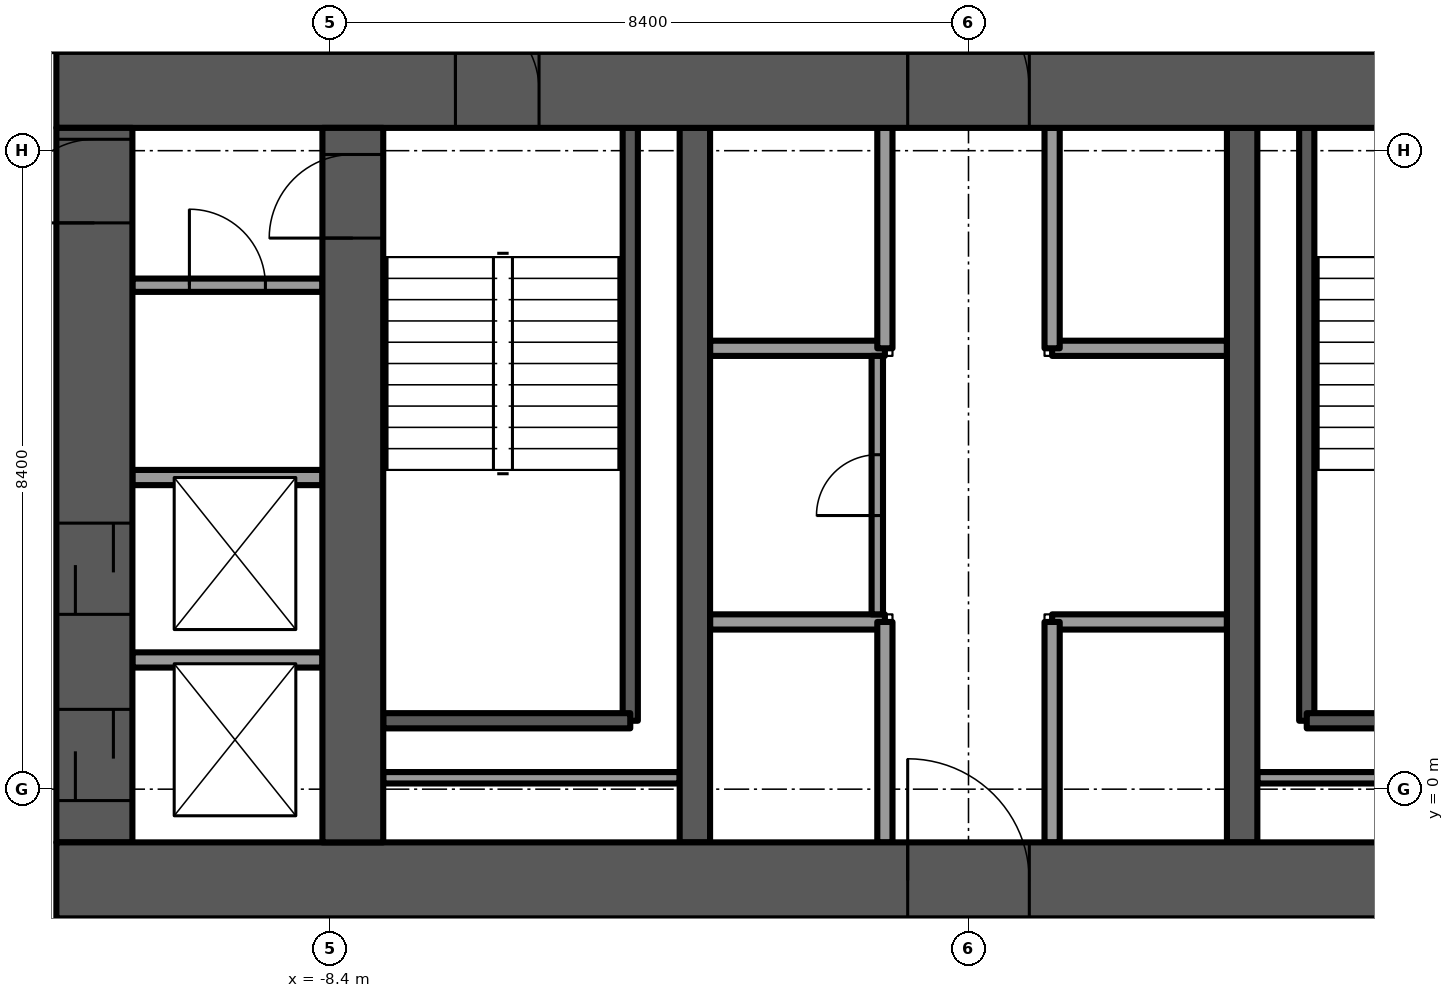
"""IFC4 building model, lengths in metres.
Left out: names, types, materials, properties, quantities, classifications, styles, units other than length and angle.
Written with IfcOpenShell. Run it as: python <this file> out.ifc"""

import sys

from ifc_helpers import new_model, si_unit, direction, frame, frame_2d, origin, place, context, subcontext, project, spatial, rectangle, extrude, element, fill, save


model = new_model("IFC4")
c1 = context("Model", 3, precision=1e-05, world=origin(), true_north=direction((0.0, 1.0)))
c2 = subcontext(c1, "Body", "Model", "MODEL_VIEW")
j1 = project(units=[si_unit("LENGTHUNIT", "METRE"), si_unit("PLANEANGLEUNIT", "RADIAN")], contexts=[c1])
p1 = place(None, origin())
s1 = spatial("IfcSite", under=j1, at=p1, CompositionType="ELEMENT")
p2 = place(p1, origin())
s2 = spatial("IfcBuilding", under=s1, at=p2, CompositionType="ELEMENT")
p3 = place(p2, frame((0.0, 0.0, 85.5)))
s3 = spatial("IfcBuildingStorey", under=s2, at=p3, CompositionType="ELEMENT", Elevation=85.5)
p4 = place(p3, frame((-12.0, -1.2, -0.3), z_axis=(0.0, 0.0, 1.0), x_axis=(1.0, 0.0, 0.0)))
e1 = element("IfcWall", 1, at=p4, inside=s3, PredefinedType="SHEAR", context=c2, shape_type="SweptSolid", body=[
    extrude(rectangle(XDim=24.0, YDim=1.0, at=frame_2d((12.0, 0.0))), origin(), (0.0, 0.0, 1.0), 3.75),
])
p5 = place(p4, frame((11.2, 0.0, 0.0)))
e2 = element("IfcOpeningElement", 2, at=p5, cuts=e1, PredefinedType="OPENING", context=c2, shape_type="SweptSolid", body=[
    extrude(rectangle(XDim=1.6, YDim=2.1, at=frame_2d((0.8, 1.05))), frame((0.0, 0.5, 0.0), z_axis=(0.0, -1.0, 0.0), x_axis=(1.0, 0.0, 0.0)), (0.0, 0.0, 1.0), 1.0),
])
p6 = place(p3, frame((-12.0, 9.2, -0.3), z_axis=(0.0, 0.0, 1.0), x_axis=(1.0, 0.0, 0.0)))
e3 = element("IfcWall", 3, at=p6, inside=s3, PredefinedType="SHEAR", context=c2, shape_type="SweptSolid", body=[
    extrude(rectangle(XDim=24.0, YDim=1.0, at=frame_2d((12.0, 0.0))), origin(), (0.0, 0.0, 1.0), 3.75),
])
p7 = place(p6, frame((11.2, 0.0, 0.0)))
e4 = element("IfcOpeningElement", 4, at=p7, cuts=e3, PredefinedType="OPENING", context=c2, shape_type="SweptSolid", body=[
    extrude(rectangle(XDim=1.6, YDim=2.1, at=frame_2d((0.8, 1.05))), frame((0.0, 0.5, 0.0), z_axis=(0.0, -1.0, 0.0), x_axis=(1.0, 0.0, 0.0)), (0.0, 0.0, 1.0), 1.0),
])
p8 = place(p6, frame((5.25, 0.0, 0.0)))
e5 = element("IfcOpeningElement", 5, at=p8, cuts=e3, PredefinedType="OPENING", context=c2, shape_type="SweptSolid", body=[
    extrude(rectangle(XDim=1.1, YDim=2.1, at=frame_2d((0.55, 1.05))), frame((0.0, 0.5, 0.0), z_axis=(0.0, -1.0, 0.0), x_axis=(1.0, 0.0, 0.0)), (0.0, 0.0, 1.0), 1.0),
])
p9 = place(p6, frame((17.65, 0.0, 0.0)))
e6 = element("IfcOpeningElement", 6, at=p9, cuts=e3, PredefinedType="OPENING", context=c2, shape_type="SweptSolid", body=[
    extrude(rectangle(XDim=1.1, YDim=2.1, at=frame_2d((0.55, 1.05))), frame((0.0, 0.5, 0.0), z_axis=(0.0, -1.0, 0.0), x_axis=(1.0, 0.0, 0.0)), (0.0, 0.0, 1.0), 1.0),
])
p10 = place(p3, frame((-8.1, -0.7, -0.3), z_axis=(0.0, 0.0, 1.0), x_axis=(0.0, 1.0, 0.0)))
e7 = element("IfcWall", 7, at=p10, inside=s3, PredefinedType="SHEAR", context=c2, shape_type="SweptSolid", body=[
    extrude(rectangle(XDim=9.4, YDim=0.8, at=frame_2d((4.7, 0.0))), origin(), (0.0, 0.0, 1.0), 3.75),
])
p11 = place(p10, frame((7.95, 0.0, 0.0)))
e8 = element("IfcOpeningElement", 8, at=p11, cuts=e7, PredefinedType="OPENING", context=c2, shape_type="SweptSolid", body=[
    extrude(rectangle(XDim=1.1, YDim=2.1, at=frame_2d((0.55, 1.05))), frame((0.0, 0.4, 0.0), z_axis=(0.0, -1.0, 0.0), x_axis=(1.0, 0.0, 0.0)), (0.0, 0.0, 1.0), 0.8),
])
for number, where, z_axis, x_axis in (
    (9, (-3.6, -0.7, -0.3), (0.0, 0.0, 1.0), (0.0, 1.0, 0.0)),
    (10, (3.6, -0.7, -0.3), (0.0, 0.0, 1.0), (0.0, 1.0, 0.0)),
):
    element("IfcWall", number, at=place(p3, frame(where, z_axis=z_axis, x_axis=x_axis)), inside=s3, PredefinedType="SHEAR", context=c2, shape_type="SweptSolid", body=[
        extrude(rectangle(XDim=9.4, YDim=0.4, at=frame_2d((4.7, 0.0))), origin(), (0.0, 0.0, 1.0), 3.75),
    ])
p12 = place(p3, frame((-11.5, -0.7, -0.3), z_axis=(0.0, 0.0, 1.0), x_axis=(0.0, 1.0, 0.0)))
e11 = element("IfcWall", 11, at=p12, inside=s3, PredefinedType="SHEAR", context=c2, shape_type="SweptSolid", body=[
    extrude(rectangle(XDim=9.4, YDim=1.0, at=frame_2d((4.7, 0.0))), origin(), (0.0, 0.0, 1.0), 3.75),
])
p13 = place(p12, frame((8.15, 0.0, 0.0)))
e12 = element("IfcOpeningElement", 12, at=p13, cuts=e11, PredefinedType="OPENING", context=c2, shape_type="SweptSolid", body=[
    extrude(rectangle(XDim=1.1, YDim=2.1, at=frame_2d((0.55, 1.05))), frame((0.0, 0.5, 0.0), z_axis=(0.0, -1.0, 0.0), x_axis=(1.0, 0.0, 0.0)), (0.0, 0.0, 1.0), 1.0),
])
p14 = place(p12, frame((0.55, 0.0, 0.0)))
e13 = element("IfcOpeningElement", 13, at=p14, cuts=e11, PredefinedType="OPENING", context=c2, shape_type="SweptSolid", body=[
    extrude(rectangle(XDim=1.2, YDim=2.1, at=frame_2d((0.6, 1.05))), frame((0.0, 0.5, 0.0), z_axis=(0.0, -1.0, 0.0), x_axis=(1.0, 0.0, 0.0)), (0.0, 0.0, 1.0), 1.0),
])
p15 = place(p12, frame((3.0, 0.0, 0.0)))
e14 = element("IfcOpeningElement", 14, at=p15, cuts=e11, PredefinedType="OPENING", context=c2, shape_type="SweptSolid", body=[
    extrude(rectangle(XDim=1.2, YDim=2.1, at=frame_2d((0.6, 1.05))), frame((0.0, 0.5, 0.0), z_axis=(0.0, -1.0, 0.0), x_axis=(1.0, 0.0, 0.0)), (0.0, 0.0, 1.0), 1.0),
])
p16 = place(p3, frame((-8.694, 18.792, 0.0), z_axis=(0.0, 0.0, 1.0), x_axis=(-0.49999341138, -0.866029207692, 0.0)))
e15 = element("IfcWall", 15, at=p16, inside=s3, PredefinedType="SOLIDWALL", context=c2, shape_type="SweptSolid", body=[
    extrude(rectangle(XDim=21.085, YDim=0.15, at=frame_2d((10.542, 0.0))), origin(), (0.0, 0.0, 1.0), 3.45),
])
p17 = place(p16, frame((4.293, 0.0, 0.15)))
e16 = element("IfcOpeningElement", 16, at=p17, cuts=e15, PredefinedType="OPENING", context=c2, shape_type="SweptSolid", body=[
    extrude(rectangle(XDim=0.9, YDim=2.85, at=frame_2d((0.45, 1.425))), frame((0.0, 0.075, 0.0), z_axis=(0.0, -1.0, 0.0), x_axis=(1.0, 0.0, 0.0)), (0.0, 0.0, 1.0), 0.15),
])
p18 = place(p16, frame((10.485, 0.0, 0.15)))
e17 = element("IfcOpeningElement", 17, at=p18, cuts=e15, PredefinedType="OPENING", context=c2, shape_type="SweptSolid", body=[
    extrude(rectangle(XDim=0.9, YDim=2.85, at=frame_2d((0.45, 1.425))), frame((0.0, 0.075, 0.0), z_axis=(0.0, -1.0, 0.0), x_axis=(1.0, 0.0, 0.0)), (0.0, 0.0, 1.0), 0.15),
])
p19 = place(p16, frame((8.156, 0.0, 0.15)))
e18 = element("IfcOpeningElement", 18, at=p19, cuts=e15, PredefinedType="OPENING", context=c2, shape_type="SweptSolid", body=[
    extrude(rectangle(XDim=1.5, YDim=2.85, at=frame_2d((0.75, 1.425))), frame((0.0, 0.075, 0.0), z_axis=(0.0, -1.0, 0.0), x_axis=(1.0, 0.0, 0.0)), (0.0, 0.0, 1.0), 0.15),
])
p20 = place(p16, frame((12.228, 0.0, 0.15)))
e19 = element("IfcOpeningElement", 19, at=p20, cuts=e15, PredefinedType="OPENING", context=c2, shape_type="SweptSolid", body=[
    extrude(rectangle(XDim=1.7, YDim=2.85, at=frame_2d((0.85, 1.425))), frame((0.0, 0.075, 0.0), z_axis=(0.0, -1.0, 0.0), x_axis=(1.0, 0.0, 0.0)), (0.0, 0.0, 1.0), 0.15),
])
p21 = place(p16, frame((14.328, 0.0, 0.15)))
e20 = element("IfcOpeningElement", 20, at=p21, cuts=e15, PredefinedType="OPENING", context=c2, shape_type="SweptSolid", body=[
    extrude(rectangle(XDim=1.5, YDim=2.85, at=frame_2d((0.75, 1.425))), frame((0.0, 0.075, 0.0), z_axis=(0.0, -1.0, 0.0), x_axis=(1.0, 0.0, 0.0)), (0.0, 0.0, 1.0), 0.15),
])
p22 = place(p16, frame((16.649, 0.0, 0.15)))
e21 = element("IfcOpeningElement", 21, at=p22, cuts=e15, PredefinedType="OPENING", context=c2, shape_type="SweptSolid", body=[
    extrude(rectangle(XDim=1.7, YDim=2.85, at=frame_2d((0.85, 1.425))), frame((0.0, 0.075, 0.0), z_axis=(0.0, -1.0, 0.0), x_axis=(1.0, 0.0, 0.0)), (0.0, 0.0, 1.0), 0.15),
])
p23 = place(p16, frame((18.528, 0.0, 0.0)))
e22 = element("IfcOpeningElement", 22, at=p23, cuts=e15, PredefinedType="OPENING", context=c2, shape_type="SweptSolid", body=[
    extrude(rectangle(XDim=1.5, YDim=2.4, at=frame_2d((0.75, 1.2))), frame((0.0, 0.075, 0.0), z_axis=(0.0, -1.0, 0.0), x_axis=(1.0, 0.0, 0.0)), (0.0, 0.0, 1.0), 0.15),
])
p24 = place(p16, frame((0.864, 0.0, 0.15)))
e23 = element("IfcOpeningElement", 23, at=p24, cuts=e15, PredefinedType="OPENING", context=c2, shape_type="SweptSolid", body=[
    extrude(rectangle(XDim=1.7, YDim=2.73, at=frame_2d((0.85, 1.365))), frame((0.0, 0.075, 0.0), z_axis=(0.0, -1.0, 0.0), x_axis=(1.0, 0.0, 0.0)), (0.0, 0.0, 1.0), 0.15),
])
p25 = place(p3, frame((-19.236, -0.532, 0.0), z_axis=(0.0, 0.0, 1.0), x_axis=(0.499995945303, -0.866027744752, 0.0)))
e24 = element("IfcWall", 24, at=p25, inside=s3, PredefinedType="SOLIDWALL", context=c2, shape_type="SweptSolid", body=[
    extrude(rectangle(XDim=18.314, YDim=0.15, at=frame_2d((9.157, 0.0))), origin(), (0.0, 0.0, 1.0), 3.45),
])
p26 = place(p25, frame((4.784, 0.0, 0.15)))
e25 = element("IfcOpeningElement", 25, at=p26, cuts=e24, PredefinedType="OPENING", context=c2, shape_type="SweptSolid", body=[
    extrude(rectangle(XDim=1.5, YDim=2.85, at=frame_2d((0.75, 1.425))), frame((0.0, 0.075, 0.0), z_axis=(0.0, -1.0, 0.0), x_axis=(1.0, 0.0, 0.0)), (0.0, 0.0, 1.0), 0.15),
])
p27 = place(p25, frame((7.357, 0.0, 0.15)))
e26 = element("IfcOpeningElement", 26, at=p27, cuts=e24, PredefinedType="OPENING", context=c2, shape_type="SweptSolid", body=[
    extrude(rectangle(XDim=1.7, YDim=2.85, at=frame_2d((0.85, 1.425))), frame((0.0, 0.075, 0.0), z_axis=(0.0, -1.0, 0.0), x_axis=(1.0, 0.0, 0.0)), (0.0, 0.0, 1.0), 0.15),
])
p28 = place(p25, frame((9.457, 0.0, 0.0)))
e27 = element("IfcOpeningElement", 27, at=p28, cuts=e24, PredefinedType="OPENING", context=c2, shape_type="SweptSolid", body=[
    extrude(rectangle(XDim=1.5, YDim=2.4, at=frame_2d((0.75, 1.2))), frame((0.0, 0.075, 0.0), z_axis=(0.0, -1.0, 0.0), x_axis=(1.0, 0.0, 0.0)), (0.0, 0.0, 1.0), 0.15),
])
p29 = place(p25, frame((11.557, 0.0, 0.15)))
e28 = element("IfcOpeningElement", 28, at=p29, cuts=e24, PredefinedType="OPENING", context=c2, shape_type="SweptSolid", body=[
    extrude(rectangle(XDim=1.7, YDim=2.85, at=frame_2d((0.85, 1.425))), frame((0.0, 0.075, 0.0), z_axis=(0.0, -1.0, 0.0), x_axis=(1.0, 0.0, 0.0)), (0.0, 0.0, 1.0), 0.15),
])
p30 = place(p25, frame((13.657, 0.0, 0.0)))
e29 = element("IfcOpeningElement", 29, at=p30, cuts=e24, PredefinedType="OPENING", context=c2, shape_type="SweptSolid", body=[
    extrude(rectangle(XDim=1.5, YDim=2.4, at=frame_2d((0.75, 1.2))), frame((0.0, 0.075, 0.0), z_axis=(0.0, -1.0, 0.0), x_axis=(1.0, 0.0, 0.0)), (0.0, 0.0, 1.0), 0.15),
])
p31 = place(p25, frame((0.528, 0.0, 0.15)))
e30 = element("IfcOpeningElement", 30, at=p31, cuts=e24, PredefinedType="OPENING", context=c2, shape_type="SweptSolid", body=[
    extrude(rectangle(XDim=1.7, YDim=2.73, at=frame_2d((0.85, 1.365))), frame((0.0, 0.075, 0.0), z_axis=(0.0, -1.0, 0.0), x_axis=(1.0, 0.0, 0.0)), (0.0, 0.0, 1.0), 0.15),
])
p32 = place(p25, frame((16.085, 0.0, 0.15)))
e31 = element("IfcOpeningElement", 31, at=p32, cuts=e24, PredefinedType="OPENING", context=c2, shape_type="SweptSolid", body=[
    extrude(rectangle(XDim=1.7, YDim=2.73, at=frame_2d((0.85, 1.365))), frame((0.0, 0.075, 0.0), z_axis=(0.0, -1.0, 0.0), x_axis=(1.0, 0.0, 0.0)), (0.0, 0.0, 1.0), 0.15),
])
for number, where, z_axis, x_axis in (
    (32, (-3.4, 2.2, 0.0), (0.0, 0.0, 1.0), (1.0, 0.0, 0.0)),
    (33, (-3.4, 5.8, 0.0), (0.0, 0.0, 1.0), (1.0, 0.0, 0.0)),
    (34, (1.1, 2.2, 0.0), (0.0, 0.0, 1.0), (1.0, 0.0, 0.0)),
    (35, (1.1, 5.8, 0.0), (0.0, 0.0, 1.0), (1.0, 0.0, 0.0)),
):
    element("IfcWall", number, at=place(p3, frame(where, z_axis=z_axis, x_axis=x_axis)), inside=s3, PredefinedType="PARTITIONING", context=c2, shape_type="SweptSolid", body=[
        extrude(rectangle(XDim=2.3, YDim=0.2, at=frame_2d((1.15, 0.0))), origin(), (0.0, 0.0, 1.0), 3.45),
    ])
for number, where, z_axis, x_axis in (
    (36, (-1.1, -0.7, 0.0), (0.0, 0.0, 1.0), (0.0, 1.0, 0.0)),
    (37, (1.1, -0.7, 0.0), (0.0, 0.0, 1.0), (0.0, 1.0, 0.0)),
    (38, (-1.1, 5.8, 0.0), (0.0, 0.0, 1.0), (0.0, 1.0, 0.0)),
    (39, (1.1, 5.8, 0.0), (0.0, 0.0, 1.0), (0.0, 1.0, 0.0)),
):
    element("IfcWall", number, at=place(p3, frame(where, z_axis=z_axis, x_axis=x_axis)), inside=s3, PredefinedType="PARTITIONING", context=c2, shape_type="SweptSolid", body=[
        extrude(rectangle(XDim=2.9, YDim=0.2, at=frame_2d((1.45, 0.0))), origin(), (0.0, 0.0, 1.0), 3.45),
    ])
p33 = place(p3, frame((-4.45, 0.9, -0.3), z_axis=(0.0, 0.0, 1.0), x_axis=(0.0, 1.0, 0.0)))
e40 = element("IfcWall", 40, at=p33, inside=s3, PredefinedType="SOLIDWALL", context=c2, shape_type="SweptSolid", body=[
    extrude(rectangle(XDim=7.8, YDim=0.2, at=frame_2d((3.9, 0.0))), origin(), (0.0, 0.0, 1.0), 3.75),
])
p34 = place(p3, frame((-7.7, 0.9, -0.3), z_axis=(0.0, 0.0, 1.0), x_axis=(1.0, 0.0, 0.0)))
e41 = element("IfcWall", 41, at=p34, inside=s3, PredefinedType="SOLIDWALL", context=c2, shape_type="SweptSolid", body=[
    extrude(rectangle(XDim=3.25, YDim=0.2, at=frame_2d((1.625, 0.0))), origin(), (0.0, 0.0, 1.0), 3.75),
])
p35 = place(p3, frame((-7.7, 0.15, 0.0), z_axis=(0.0, 0.0, 1.0), x_axis=(1.0, 0.0, 0.0)))
e42 = element("IfcWall", 42, at=p35, inside=s3, PredefinedType="PARTITIONING", context=c2, shape_type="SweptSolid", body=[
    extrude(rectangle(XDim=3.9, YDim=0.15, at=frame_2d((1.95, 0.0))), origin(), (0.0, 0.0, 1.0), 3.45),
])
p36 = place(p3, frame((4.45, 0.9, -0.3), z_axis=(0.0, 0.0, 1.0), x_axis=(0.0, 1.0, 0.0)))
e43 = element("IfcWall", 43, at=p36, inside=s3, PredefinedType="SOLIDWALL", context=c2, shape_type="SweptSolid", body=[
    extrude(rectangle(XDim=7.8, YDim=0.2, at=frame_2d((3.9, 0.0))), origin(), (0.0, 0.0, 1.0), 3.75),
])
p37 = place(p3, frame((4.45, 0.9, -0.3), z_axis=(0.0, 0.0, 1.0), x_axis=(1.0, 0.0, 0.0)))
e44 = element("IfcWall", 44, at=p37, inside=s3, PredefinedType="SOLIDWALL", context=c2, shape_type="SweptSolid", body=[
    extrude(rectangle(XDim=3.25, YDim=0.2, at=frame_2d((1.625, 0.0))), origin(), (0.0, 0.0, 1.0), 3.75),
])
p38 = place(p3, frame((3.8, 0.15, 0.0), z_axis=(0.0, 0.0, 1.0), x_axis=(1.0, 0.0, 0.0)))
e45 = element("IfcWall", 45, at=p38, inside=s3, PredefinedType="PARTITIONING", context=c2, shape_type="SweptSolid", body=[
    extrude(rectangle(XDim=3.9, YDim=0.15, at=frame_2d((1.95, 0.0))), origin(), (0.0, 0.0, 1.0), 3.45),
])
p39 = place(p3, frame((-1.2, 2.3, 0.0), z_axis=(0.0, 0.0, 1.0), x_axis=(0.0, 1.0, 0.0)))
e46 = element("IfcWall", 46, at=p39, inside=s3, PredefinedType="PARTITIONING", context=c2, shape_type="SweptSolid", body=[
    extrude(rectangle(XDim=3.4, YDim=0.15, at=frame_2d((1.7, 0.0))), origin(), (0.0, 0.0, 1.0), 3.45),
])
p40 = place(p39, frame((1.3, 0.0, 0.0)))
e47 = element("IfcOpeningElement", 47, at=p40, cuts=e46, PredefinedType="OPENING", context=c2, shape_type="SweptSolid", body=[
    extrude(rectangle(XDim=0.8, YDim=2.1, at=frame_2d((0.4, 1.05))), frame((0.0, 0.075, 0.0), z_axis=(0.0, -1.0, 0.0), x_axis=(1.0, 0.0, 0.0)), (0.0, 0.0, 1.0), 0.15),
])
for number, where, z_axis, x_axis in (
    (48, (-11.0, 1.7, 0.0), (0.0, 0.0, 1.0), (1.0, 0.0, 0.0)),
    (49, (-11.0, 4.1, 0.0), (0.0, 0.0, 1.0), (1.0, 0.0, 0.0)),
):
    element("IfcWall", number, at=place(p3, frame(where, z_axis=z_axis, x_axis=x_axis)), inside=s3, PredefinedType="PARTITIONING", context=c2, shape_type="SweptSolid", body=[
        extrude(rectangle(XDim=2.5, YDim=0.2, at=frame_2d((1.25, 0.0))), origin(), (0.0, 0.0, 1.0), 3.45),
    ])
p41 = place(p3, frame((-11.0, 6.63, 0.0), z_axis=(0.0, 0.0, 1.0), x_axis=(1.0, 0.0, 0.0)))
e50 = element("IfcWall", 50, at=p41, inside=s3, PredefinedType="PARTITIONING", context=c2, shape_type="SweptSolid", body=[
    extrude(rectangle(XDim=2.5, YDim=0.175, at=frame_2d((1.25, 0.0))), origin(), (0.0, 0.0, 1.0), 3.45),
])
p42 = place(p41, frame((0.75, 0.0, 0.0)))
e51 = element("IfcOpeningElement", 51, at=p42, cuts=e50, PredefinedType="OPENING", context=c2, shape_type="SweptSolid", body=[
    extrude(rectangle(XDim=1.0, YDim=2.1, at=frame_2d((0.5, 1.05))), frame((0.0, 0.087, 0.0), z_axis=(0.0, -1.0, 0.0), x_axis=(1.0, 0.0, 0.0)), (0.0, 0.0, 1.0), 0.175),
])
p43 = place(p5, origin())
e52 = element("IfcDoor", 52, at=p43, inside=s3, OperationType="DOUBLE_DOOR_SINGLE_SWING", PredefinedType="DOOR", context=c2, shape_type="SweptSolid", body=[
    extrude(rectangle(XDim=1.6, YDim=2.1, at=frame_2d((0.8, 1.05))), frame((0.0, 0.025, 0.0), z_axis=(0.0, -1.0, 0.0), x_axis=(1.0, 0.0, 0.0)), (0.0, 0.0, 1.0), 0.05),
])
fill(e2, e52)
p44 = place(p7, origin())
e53 = element("IfcDoor", 53, at=p44, inside=s3, OperationType="DOUBLE_DOOR_SINGLE_SWING", PredefinedType="DOOR", context=c2, shape_type="SweptSolid", body=[
    extrude(rectangle(XDim=1.6, YDim=2.1, at=frame_2d((0.8, 1.05))), frame((0.0, 0.025, 0.0), z_axis=(0.0, -1.0, 0.0), x_axis=(1.0, 0.0, 0.0)), (0.0, 0.0, 1.0), 0.05),
])
fill(e4, e53)
p45 = place(p8, origin())
e54 = element("IfcDoor", 54, at=p45, inside=s3, OperationType="SINGLE_SWING_LEFT", PredefinedType="DOOR", context=c2, shape_type="SweptSolid", body=[
    extrude(rectangle(XDim=1.1, YDim=2.1, at=frame_2d((0.55, 1.05))), frame((0.0, 0.025, 0.0), z_axis=(0.0, -1.0, 0.0), x_axis=(1.0, 0.0, 0.0)), (0.0, 0.0, 1.0), 0.05),
])
fill(e5, e54)
p46 = place(p11, origin())
e55 = element("IfcDoor", 55, at=p46, inside=s3, OperationType="SINGLE_SWING_RIGHT", PredefinedType="DOOR", context=c2, shape_type="SweptSolid", body=[
    extrude(rectangle(XDim=1.1, YDim=2.1, at=frame_2d((0.55, 1.05))), frame((0.0, 0.025, 0.0), z_axis=(0.0, -1.0, 0.0), x_axis=(1.0, 0.0, 0.0)), (0.0, 0.0, 1.0), 0.05),
])
fill(e8, e55)
p47 = place(p40, origin())
e56 = element("IfcDoor", 56, at=p47, inside=s3, OperationType="SINGLE_SWING_LEFT", PredefinedType="DOOR", context=c2, shape_type="SweptSolid", body=[
    extrude(rectangle(XDim=0.8, YDim=2.1, at=frame_2d((0.4, 1.05))), frame((0.0, 0.025, 0.0), z_axis=(0.0, -1.0, 0.0), x_axis=(1.0, 0.0, 0.0)), (0.0, 0.0, 1.0), 0.05),
])
fill(e47, e56)
p48 = place(p42, origin())
e57 = element("IfcDoor", 57, at=p48, inside=s3, OperationType="SINGLE_SWING_LEFT", PredefinedType="DOOR", context=c2, shape_type="SweptSolid", body=[
    extrude(rectangle(XDim=1.0, YDim=2.1, at=frame_2d((0.5, 1.05))), frame((0.0, 0.025, 0.0), z_axis=(0.0, -1.0, 0.0), x_axis=(1.0, 0.0, 0.0)), (0.0, 0.0, 1.0), 0.05),
])
fill(e51, e57)
p49 = place(p13, origin())
e58 = element("IfcDoor", 58, at=p49, inside=s3, OperationType="SINGLE_SWING_LEFT", PredefinedType="DOOR", context=c2, shape_type="SweptSolid", body=[
    extrude(rectangle(XDim=1.1, YDim=2.1, at=frame_2d((0.55, 1.05))), frame((0.0, 0.025, 0.0), z_axis=(0.0, -1.0, 0.0), x_axis=(1.0, 0.0, 0.0)), (0.0, 0.0, 1.0), 0.05),
])
fill(e12, e58)
p50 = place(p14, origin())
e59 = element("IfcDoor", 59, at=p50, inside=s3, OperationType="SLIDING_TO_LEFT", PredefinedType="DOOR", context=c2, shape_type="SweptSolid", body=[
    extrude(rectangle(XDim=1.2, YDim=2.1, at=frame_2d((0.6, 1.05))), frame((0.0, 0.025, 0.0), z_axis=(0.0, -1.0, 0.0), x_axis=(1.0, 0.0, 0.0)), (0.0, 0.0, 1.0), 0.05),
])
fill(e13, e59)
p51 = place(p15, origin())
e60 = element("IfcDoor", 60, at=p51, inside=s3, OperationType="SLIDING_TO_LEFT", PredefinedType="DOOR", context=c2, shape_type="SweptSolid", body=[
    extrude(rectangle(XDim=1.2, YDim=2.1, at=frame_2d((0.6, 1.05))), frame((0.0, 0.025, 0.0), z_axis=(0.0, -1.0, 0.0), x_axis=(1.0, 0.0, 0.0)), (0.0, 0.0, 1.0), 0.05),
])
fill(e14, e60)
save(model, sys.argv[1])
